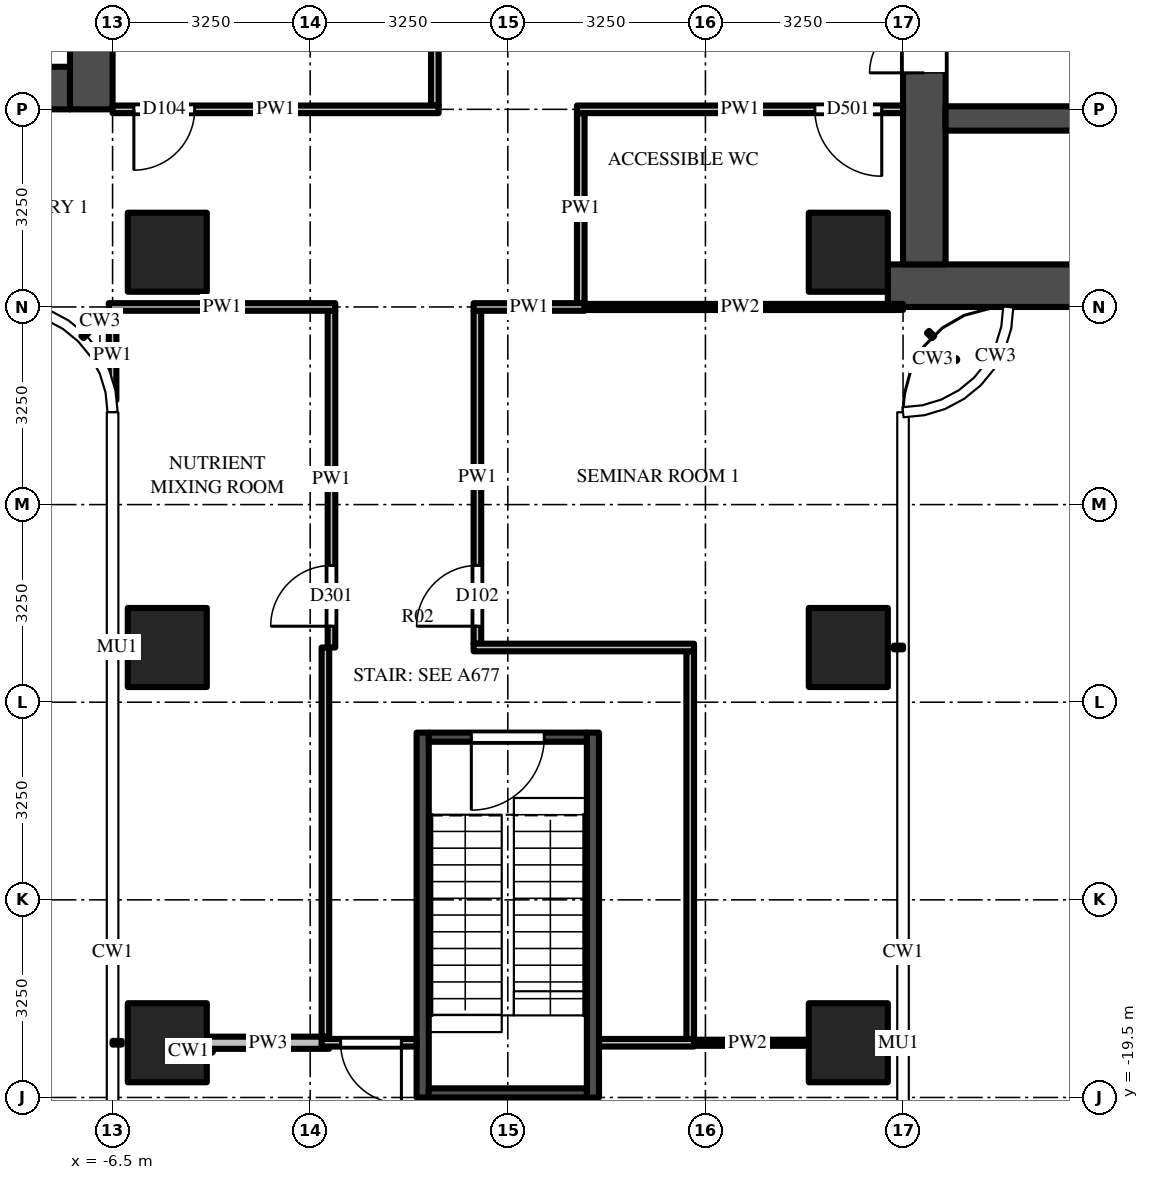
"""IFC4 building model, lengths in metres.
Left out: names, types, materials, properties, quantities, classifications, styles, units other than length and angle.
Written with IfcOpenShell. Run it as: python <this file> out.ifc"""

import sys

from ifc_helpers import new_model, si_unit, direction, frame, frame_2d, origin, origin_2d, place, context, subcontext, project, spatial, rectangle, extrude, source, transform, mapped, element, fill, save


model = new_model("IFC4")
c1 = context("Model", 3, precision=1e-05, world=origin(), true_north=direction((0.0, 1.0)))
c2 = subcontext(c1, "Body", "Model", "MODEL_VIEW")
j1 = project(units=[si_unit("LENGTHUNIT", "METRE"), si_unit("PLANEANGLEUNIT", "RADIAN")], contexts=[c1])
p1 = place(None, origin())
s1 = spatial("IfcSite", under=j1, at=p1, CompositionType="ELEMENT")
p2 = place(p1, origin())
s2 = spatial("IfcBuilding", under=s1, at=p2, CompositionType="ELEMENT")
p3 = place(p2, frame((0.0, 0.0, 102.0)))
s3 = spatial("IfcBuildingStorey", under=s2, at=p3, CompositionType="ELEMENT", Elevation=102.0)
m1 = source(origin(), c2, "Body", "SweptSolid", [
    extrude(rectangle(XDim=1.3, YDim=1.3, at=origin_2d()), origin(), (0.0, 0.0, 1.0), 4.5),
])
for number, where, z_axis, x_axis in (
    (1, (5.6, -5.6, 0.0), (0.0, 0.0, 1.0), (1.0, 0.0, 0.0)),
    (2, (-5.6, -5.6, 0.0), (0.0, 0.0, 1.0), (1.0, 0.0, 0.0)),
    (3, (5.6, -12.1, 0.0), (0.0, 0.0, 1.0), (1.0, 0.0, 0.0)),
    (4, (5.6, -18.6, 0.0), (0.0, 0.0, 1.0), (1.0, 0.0, 0.0)),
    (5, (-5.6, -12.1, 0.0), (0.0, 0.0, 1.0), (1.0, 0.0, 0.0)),
    (6, (-5.6, -18.6, 0.0), (0.0, 0.0, 1.0), (1.0, 0.0, 0.0)),
):
    element("IfcColumn", number, at=place(p3, frame(where, z_axis=z_axis, x_axis=x_axis)), inside=s3, PredefinedType="COLUMN", context=c2, shape_type="MappedRepresentation", body=[
        mapped(m1, transform((0.0, 0.0, 0.0))),
    ])
m2 = source(origin(), c2, "Body", "SweptSolid", [
    extrude(rectangle(XDim=16.5, YDim=0.7, at=frame_2d((8.25, 0.0))), origin(), (0.0, 0.0, 1.0), 4.25),
])
p4 = place(p3, frame((6.25, -6.15, 0.0), z_axis=(0.0, 0.0, 1.0), x_axis=(1.0, 0.0, 0.0)))
e7 = element("IfcWall", 7, at=p4, inside=s3, PredefinedType="SHEAR", context=c2, shape_type="MappedRepresentation", body=[
    mapped(m2, transform((0.0, 0.0, 0.0))),
])
m3 = source(origin(), c2, "Body", "SweptSolid", [
    extrude(rectangle(XDim=9.05, YDim=0.7, at=frame_2d((4.525, 0.0))), origin(), (0.0, 0.0, 1.0), 4.25),
])
p5 = place(p3, frame((6.85, -5.8, 0.0), z_axis=(0.0, 0.0, 1.0), x_axis=(0.0, 1.0, 0.0)))
e8 = element("IfcWall", 8, at=p5, inside=s3, PredefinedType="SHEAR", context=c2, shape_type="MappedRepresentation", body=[
    mapped(m3, transform((0.0, 0.0, 0.0))),
])
m4 = source(origin(), c2, "Body", "SweptSolid", [
    extrude(rectangle(XDim=1.8, YDim=2.1, at=frame_2d((0.9, 1.05))), frame((0.0, 0.36, 0.0), z_axis=(0.0, -1.0, 0.0), x_axis=(1.0, 0.0, 0.0)), (0.0, 0.0, 1.0), 0.72),
])
p6 = place(p5, frame((3.15, 0.0, 0.0)))
e9 = element("IfcOpeningElement", 9, at=p6, cuts=e8, PredefinedType="OPENING", context=c2, shape_type="MappedRepresentation", body=[
    mapped(m4, transform((0.0, 0.0, 0.0))),
])
m5 = source(origin(), c2, "Body", "SweptSolid", [
    extrude(rectangle(XDim=7.5, YDim=0.4, at=frame_2d((3.75, 0.0))), origin(), (0.0, 0.0, 1.0), 4.25),
])
p7 = place(p3, frame((7.2, -3.4, 0.0), z_axis=(0.0, 0.0, 1.0), x_axis=(1.0, 0.0, 0.0)))
e10 = element("IfcWall", 10, at=p7, inside=s3, PredefinedType="SHEAR", context=c2, shape_type="MappedRepresentation", body=[
    mapped(m5, transform((0.0, 0.0, 0.0))),
])
m6 = source(origin(), c2, "Body", "SweptSolid", [
    extrude(rectangle(XDim=1.1, YDim=2.1, at=frame_2d((0.55, 1.05))), frame((0.0, 0.21, 0.0), z_axis=(0.0, -1.0, 0.0), x_axis=(1.0, 0.0, 0.0)), (0.0, 0.0, 1.0), 0.42),
])
p8 = place(p7, frame((3.0, 0.0, 0.0)))
e11 = element("IfcOpeningElement", 11, at=p8, cuts=e10, PredefinedType="OPENING", context=c2, shape_type="MappedRepresentation", body=[
    mapped(m6, transform((0.0, 0.0, 0.0))),
])
p9 = place(p7, frame((5.5, 0.0, 0.0)))
e12 = element("IfcOpeningElement", 12, at=p9, cuts=e10, PredefinedType="OPENING", context=c2, shape_type="MappedRepresentation", body=[
    mapped(m6, transform((0.0, 0.0, 0.0))),
])
m7 = source(origin(), c2, "Body", "SweptSolid", [
    extrude(rectangle(XDim=14.85, YDim=0.7, at=frame_2d((7.425, 0.0))), origin(), (0.0, 0.0, 1.0), 4.25),
])
p10 = place(p3, frame((-7.2, -2.9, 0.0), z_axis=(0.0, 0.0, 1.0), x_axis=(-1.0, 0.0, 0.0)))
e13 = element("IfcWall", 13, at=p10, inside=s3, PredefinedType="SHEAR", context=c2, shape_type="MappedRepresentation", body=[
    mapped(m7, transform((0.0, 0.0, 0.0))),
])
m8 = source(origin(), c2, "Body", "SweptSolid", [
    extrude(rectangle(XDim=1.3, YDim=2.1, at=frame_2d((0.65, 1.05))), frame((0.0, 0.36, 0.0), z_axis=(0.0, -1.0, 0.0), x_axis=(1.0, 0.0, 0.0)), (0.0, 0.0, 1.0), 0.72),
])
p11 = place(p10, frame((12.2, 0.0, 0.0)))
e14 = element("IfcOpeningElement", 14, at=p11, cuts=e13, PredefinedType="OPENING", context=c2, shape_type="MappedRepresentation", body=[
    mapped(m8, transform((0.0, 0.0, 0.0))),
])
m9 = source(origin(), c2, "Body", "SweptSolid", [
    extrude(rectangle(XDim=1.2, YDim=2.1, at=frame_2d((0.6, 1.05))), frame((0.0, 0.36, 0.0), z_axis=(0.0, -1.0, 0.0), x_axis=(1.0, 0.0, 0.0)), (0.0, 0.0, 1.0), 0.72),
])
p12 = place(p10, frame((9.85, 0.0, 0.0)))
e15 = element("IfcOpeningElement", 15, at=p12, cuts=e13, PredefinedType="OPENING", context=c2, shape_type="MappedRepresentation", body=[
    mapped(m9, transform((0.0, 0.0, 0.0))),
])
m10 = source(origin(), c2, "Body", "SweptSolid", [
    extrude(rectangle(XDim=1.0, YDim=2.1, at=frame_2d((0.5, 1.05))), frame((0.0, 0.36, 0.0), z_axis=(0.0, -1.0, 0.0), x_axis=(1.0, 0.0, 0.0)), (0.0, 0.0, 1.0), 0.72),
])
p13 = place(p10, frame((7.9, 0.0, 0.0)))
e16 = element("IfcOpeningElement", 16, at=p13, cuts=e13, PredefinedType="OPENING", context=c2, shape_type="MappedRepresentation", body=[
    mapped(m10, transform((0.0, 0.0, 0.0))),
])
m11 = source(origin(), c2, "Body", "SweptSolid", [
    extrude(rectangle(XDim=0.9, YDim=2.1, at=frame_2d((0.45, 1.05))), frame((0.0, 0.36, 0.0), z_axis=(0.0, -1.0, 0.0), x_axis=(1.0, 0.0, 0.0)), (0.0, 0.0, 1.0), 0.72),
])
p14 = place(p10, frame((0.65, 0.0, 0.0)))
e17 = element("IfcOpeningElement", 17, at=p14, cuts=e13, PredefinedType="OPENING", context=c2, shape_type="MappedRepresentation", body=[
    mapped(m11, transform((0.0, 0.0, 0.0))),
])
p15 = place(p10, frame((3.25, 0.0, 0.0)))
e18 = element("IfcOpeningElement", 18, at=p15, cuts=e13, PredefinedType="OPENING", context=c2, shape_type="MappedRepresentation", body=[
    mapped(m11, transform((0.0, 0.0, 0.0))),
])
p16 = place(p10, frame((5.8, 0.0, 0.0)))
e19 = element("IfcOpeningElement", 19, at=p16, cuts=e13, PredefinedType="OPENING", context=c2, shape_type="MappedRepresentation", body=[
    mapped(m10, transform((0.0, 0.0, 0.0))),
])
p17 = place(p3, frame((-6.85, 5.8, 0.0), z_axis=(0.0, 0.0, 1.0), x_axis=(0.0, -1.0, 0.0)))
e20 = element("IfcWall", 20, at=p17, inside=s3, PredefinedType="SHEAR", context=c2, shape_type="MappedRepresentation", body=[
    mapped(m3, transform((0.0, 0.0, 0.0))),
])
p18 = place(p17, frame((3.15, 0.0, 0.0)))
e21 = element("IfcOpeningElement", 21, at=p18, cuts=e20, PredefinedType="OPENING", context=c2, shape_type="MappedRepresentation", body=[
    mapped(m4, transform((0.0, 0.0, 0.0))),
])
m12 = source(origin(), c2, "Body", "SweptSolid", [
    extrude(rectangle(XDim=6.0, YDim=0.2, at=frame_2d((3.0, 0.0))), origin(), (0.0, 0.0, 1.0), 4.25),
])
for number, where, z_axis, x_axis in (
    (22, (1.4, -13.5, 0.0), (0.0, 0.0, 1.0), (0.0, -1.0, 0.0)),
    (23, (-1.4, -13.5, 0.0), (0.0, 0.0, 1.0), (0.0, -1.0, 0.0)),
):
    element("IfcWall", number, at=place(p3, frame(where, z_axis=z_axis, x_axis=x_axis)), inside=s3, PredefinedType="SHEAR", context=c2, shape_type="MappedRepresentation", body=[
        mapped(m12, transform((0.0, 0.0, 0.0))),
    ])
m13 = source(origin(), c2, "Body", "SweptSolid", [
    extrude(rectangle(XDim=2.6, YDim=0.15, at=frame_2d((1.3, 0.0))), origin(), (0.0, 0.0, 1.0), 4.25),
])
p19 = place(p3, frame((1.3, -13.575, 0.0), z_axis=(0.0, 0.0, 1.0), x_axis=(-1.0, 0.0, 0.0)))
e24 = element("IfcWall", 24, at=p19, inside=s3, PredefinedType="SHEAR", context=c2, shape_type="MappedRepresentation", body=[
    mapped(m13, transform((0.0, 0.0, 0.0))),
])
m14 = source(origin(), c2, "Body", "SweptSolid", [
    extrude(rectangle(XDim=1.2, YDim=2.1, at=frame_2d((0.6, 1.05))), frame((0.0, 0.085, 0.0), z_axis=(0.0, -1.0, 0.0), x_axis=(1.0, 0.0, 0.0)), (0.0, 0.0, 1.0), 0.17),
])
p20 = place(p19, frame((0.7, 0.0, 0.0)))
e25 = element("IfcOpeningElement", 25, at=p20, cuts=e24, PredefinedType="OPENING", context=c2, shape_type="MappedRepresentation", body=[
    mapped(m14, transform((0.0, 0.0, 0.0))),
])
p21 = place(p3, frame((1.3, -19.425, 0.0), z_axis=(0.0, 0.0, 1.0), x_axis=(-1.0, 0.0, 0.0)))
e26 = element("IfcWall", 26, at=p21, inside=s3, PredefinedType="SHEAR", context=c2, shape_type="MappedRepresentation", body=[
    mapped(m13, transform((0.0, 0.0, 0.0))),
])
m15 = source(origin(), c2, "Body", "SweptSolid", [
    extrude(rectangle(XDim=1.469, YDim=0.125, at=frame_2d((0.734, 0.0))), origin(), (0.0, 0.0, 1.0), 4.25),
])
p22 = place(p3, frame((-6.5, -6.562, 0.0), z_axis=(0.0, 0.0, 1.0), x_axis=(0.0, -1.0, 0.0)))
e27 = element("IfcWall", 27, at=p22, inside=s3, PredefinedType="PARTITIONING", context=c2, shape_type="MappedRepresentation", body=[
    mapped(m15, transform((0.0, 0.0, 0.0))),
])
m16 = source(origin(), c2, "Body", "SweptSolid", [
    extrude(rectangle(XDim=6.4, YDim=0.125, at=frame_2d((3.2, 0.0))), origin(), (0.0, 0.0, 1.0), 3.468),
])
p23 = place(p3, frame((-3.0, -18.5, 0.0), z_axis=(0.0, 0.0, 1.0), x_axis=(0.0, 1.0, 0.0)))
e28 = element("IfcWall", 28, at=p23, inside=s3, PredefinedType="PARTITIONING", context=c2, shape_type="MappedRepresentation", body=[
    mapped(m16, transform((0.0, 0.0, 0.0))),
])
m17 = source(origin(), c2, "Body", "SweptSolid", [
    extrude(rectangle(XDim=5.538, YDim=0.125, at=frame_2d((2.769, 0.0))), origin(), (0.0, 0.0, 1.0), 3.468),
])
p24 = place(p3, frame((-2.9, -12.1, 0.0), z_axis=(0.0, 0.0, 1.0), x_axis=(0.0, 1.0, 0.0)))
e29 = element("IfcWall", 29, at=p24, inside=s3, PredefinedType="PARTITIONING", context=c2, shape_type="MappedRepresentation", body=[
    mapped(m17, transform((0.0, 0.0, 0.0))),
])
m18 = source(origin(), c2, "Body", "SweptSolid", [
    extrude(rectangle(XDim=1.0, YDim=2.1, at=frame_2d((0.5, 1.05))), frame((0.0, 0.073, 0.0), z_axis=(0.0, -1.0, 0.0), x_axis=(1.0, 0.0, 0.0)), (0.0, 0.0, 1.0), 0.145),
])
p25 = place(p24, frame((0.35, 0.0, 0.0)))
e30 = element("IfcOpeningElement", 30, at=p25, cuts=e29, PredefinedType="OPENING", context=c2, shape_type="MappedRepresentation", body=[
    mapped(m18, transform((0.0, 0.0, 0.0))),
])
m19 = source(origin(), c2, "Body", "SweptSolid", [
    extrude(rectangle(XDim=3.125, YDim=0.125, at=frame_2d((1.562, 0.0))), origin(), (0.0, 0.0, 1.0), 3.546),
])
p26 = place(p3, frame((-1.2, -0.062, 0.0), z_axis=(0.0, 0.0, 1.0), x_axis=(0.0, -1.0, 0.0)))
e31 = element("IfcWall", 31, at=p26, inside=s3, PredefinedType="PARTITIONING", context=c2, shape_type="MappedRepresentation", body=[
    mapped(m19, transform((0.0, 0.0, 0.0))),
])
m20 = source(origin(), c2, "Body", "SweptSolid", [
    extrude(rectangle(XDim=5.475, YDim=0.125, at=frame_2d((2.738, 0.0))), origin(), (0.0, 0.0, 1.0), 3.468),
])
p27 = place(p3, frame((-0.5, -12.038, 0.0), z_axis=(0.0, 0.0, 1.0), x_axis=(0.0, 1.0, 0.0)))
e32 = element("IfcWall", 32, at=p27, inside=s3, PredefinedType="PARTITIONING", context=c2, shape_type="MappedRepresentation", body=[
    mapped(m20, transform((0.0, 0.0, 0.0))),
])
p28 = place(p27, frame((0.288, 0.0, 0.0)))
e33 = element("IfcOpeningElement", 33, at=p28, cuts=e32, PredefinedType="OPENING", context=c2, shape_type="MappedRepresentation", body=[
    mapped(m18, transform((0.0, 0.0, 0.0))),
])
m21 = source(origin(), c2, "Body", "SweptSolid", [
    extrude(rectangle(XDim=3.137, YDim=0.125, at=frame_2d((1.569, 0.0))), origin(), (0.0, 0.0, 1.0), 3.468),
])
p29 = place(p3, frame((1.2, -3.312, 0.0), z_axis=(0.0, 0.0, 1.0), x_axis=(0.0, -1.0, 0.0)))
e34 = element("IfcWall", 34, at=p29, inside=s3, PredefinedType="PARTITIONING", context=c2, shape_type="MappedRepresentation", body=[
    mapped(m21, transform((0.0, 0.0, 0.0))),
])
m22 = source(origin(), c2, "Body", "SweptSolid", [
    extrude(rectangle(XDim=6.387, YDim=0.125, at=frame_2d((3.194, 0.0))), origin(), (0.0, 0.0, 1.0), 3.468),
])
p30 = place(p3, frame((3.0, -12.163, 0.0), z_axis=(0.0, 0.0, 1.0), x_axis=(0.0, -1.0, 0.0)))
e35 = element("IfcWall", 35, at=p30, inside=s3, PredefinedType="PARTITIONING", context=c2, shape_type="MappedRepresentation", body=[
    mapped(m22, transform((0.0, 0.0, 0.0))),
])
m23 = source(origin(), c2, "Body", "SweptSolid", [
    extrude(rectangle(XDim=2.012, YDim=0.2, at=frame_2d((1.006, 0.0))), origin(), (0.0, 0.0, 1.0), 3.697),
])
p31 = place(p3, frame((-4.95, -18.6, 0.0), z_axis=(0.0, 0.0, 1.0), x_axis=(1.0, 0.0, 0.0)))
e36 = element("IfcWall", 36, at=p31, inside=s3, PredefinedType="PARTITIONING", context=c2, shape_type="MappedRepresentation", body=[
    mapped(m23, transform((0.0, 0.0, 0.0))),
])
m24 = source(origin(), c2, "Body", "SweptSolid", [
    extrude(rectangle(XDim=2.012, YDim=0.1, at=frame_2d((1.006, 0.0))), origin(), (0.0, 0.0, 1.0), 3.697),
])
p32 = place(p3, frame((2.938, -18.6, 0.0), z_axis=(0.0, 0.0, 1.0), x_axis=(1.0, 0.0, 0.0)))
e37 = element("IfcWall", 37, at=p32, inside=s3, PredefinedType="PARTITIONING", context=c2, shape_type="MappedRepresentation", body=[
    mapped(m24, transform((0.0, 0.0, 0.0))),
])
m25 = source(origin(), c2, "Body", "SweptSolid", [
    extrude(rectangle(XDim=1.562, YDim=0.125, at=frame_2d((0.781, 0.0))), origin(), (0.0, 0.0, 1.0), 3.697),
])
p33 = place(p3, frame((-1.5, -18.6, 0.0), z_axis=(0.0, 0.0, 1.0), x_axis=(-1.0, 0.0, 0.0)))
e38 = element("IfcWall", 38, at=p33, inside=s3, PredefinedType="PARTITIONING", context=c2, shape_type="MappedRepresentation", body=[
    mapped(m25, transform((0.0, 0.0, 0.0))),
])
p34 = place(p33, frame((0.25, 0.0, 0.0)))
e39 = element("IfcOpeningElement", 39, at=p34, cuts=e38, PredefinedType="OPENING", context=c2, shape_type="MappedRepresentation", body=[
    mapped(m18, transform((0.0, 0.0, 0.0))),
])
p35 = place(p3, frame((3.062, -18.6, 0.0), z_axis=(0.0, 0.0, 1.0), x_axis=(-1.0, 0.0, 0.0)))
e40 = element("IfcWall", 40, at=p35, inside=s3, PredefinedType="PARTITIONING", context=c2, shape_type="MappedRepresentation", body=[
    mapped(m25, transform((0.0, 0.0, 0.0))),
])
m26 = source(origin(), c2, "Body", "SweptSolid", [
    extrude(rectangle(XDim=3.625, YDim=0.125, at=frame_2d((1.812, 0.0))), origin(), (0.0, 0.0, 1.0), 3.468),
])
p36 = place(p3, frame((-0.562, -12.1, 0.0), z_axis=(0.0, 0.0, 1.0), x_axis=(1.0, 0.0, 0.0)))
e41 = element("IfcWall", 41, at=p36, inside=s3, PredefinedType="PARTITIONING", context=c2, shape_type="MappedRepresentation", body=[
    mapped(m26, transform((0.0, 0.0, 0.0))),
])
m27 = source(origin(), c2, "Body", "SweptSolid", [
    extrude(rectangle(XDim=5.363, YDim=0.1, at=frame_2d((2.681, 0.0))), origin(), (0.0, 0.0, 1.0), 3.33),
])
p37 = place(p3, frame((1.137, -6.5, 0.0), z_axis=(0.0, 0.0, 1.0), x_axis=(1.0, 0.0, 0.0)))
e42 = element("IfcWall", 42, at=p37, inside=s3, PredefinedType="PARTITIONING", context=c2, shape_type="MappedRepresentation", body=[
    mapped(m27, transform((0.0, 0.0, 0.0))),
])
m28 = source(origin(), c2, "Body", "SweptSolid", [
    extrude(rectangle(XDim=3.725, YDim=0.125, at=frame_2d((1.863, 0.0))), origin(), (0.0, 0.0, 1.0), 3.33),
])
p38 = place(p3, frame((-2.837, -6.5, 0.0), z_axis=(0.0, 0.0, 1.0), x_axis=(-1.0, 0.0, 0.0)))
e43 = element("IfcWall", 43, at=p38, inside=s3, PredefinedType="PARTITIONING", context=c2, shape_type="MappedRepresentation", body=[
    mapped(m28, transform((0.0, 0.0, 0.0))),
])
m29 = source(origin(), c2, "Body", "SweptSolid", [
    extrude(rectangle(XDim=1.825, YDim=0.125, at=frame_2d((0.913, 0.0))), origin(), (0.0, 0.0, 1.0), 4.25),
])
p39 = place(p3, frame((1.262, -6.5, 0.0), z_axis=(0.0, 0.0, 1.0), x_axis=(-1.0, 0.0, 0.0)))
e44 = element("IfcWall", 44, at=p39, inside=s3, PredefinedType="PARTITIONING", context=c2, shape_type="MappedRepresentation", body=[
    mapped(m29, transform((0.0, 0.0, 0.0))),
])
m30 = source(origin(), c2, "Body", "SweptSolid", [
    extrude(rectangle(XDim=5.363, YDim=0.125, at=frame_2d((2.681, 0.0))), origin(), (0.0, 0.0, 1.0), 3.468),
])
p40 = place(p3, frame((-1.137, -3.25, 0.0), z_axis=(0.0, 0.0, 1.0), x_axis=(-1.0, 0.0, 0.0)))
e45 = element("IfcWall", 45, at=p40, inside=s3, PredefinedType="PARTITIONING", context=c2, shape_type="MappedRepresentation", body=[
    mapped(m30, transform((0.0, 0.0, 0.0))),
])
p41 = place(p40, frame((4.012, 0.0, 0.0)))
e46 = element("IfcOpeningElement", 46, at=p41, cuts=e45, PredefinedType="OPENING", context=c2, shape_type="MappedRepresentation", body=[
    mapped(m18, transform((0.0, 0.0, 0.0))),
])
p42 = place(p3, frame((6.5, -3.25, 0.0), z_axis=(0.0, 0.0, 1.0), x_axis=(-1.0, 0.0, 0.0)))
e47 = element("IfcWall", 47, at=p42, inside=s3, PredefinedType="PARTITIONING", context=c2, shape_type="MappedRepresentation", body=[
    mapped(m30, transform((0.0, 0.0, 0.0))),
])
m31 = source(origin(), c2, "Body", "SweptSolid", [
    extrude(rectangle(XDim=1.1, YDim=2.1, at=frame_2d((0.55, 1.05))), frame((0.0, 0.073, 0.0), z_axis=(0.0, -1.0, 0.0), x_axis=(1.0, 0.0, 0.0)), (0.0, 0.0, 1.0), 0.145),
])
p43 = place(p42, frame((0.35, 0.0, 0.0)))
e48 = element("IfcOpeningElement", 48, at=p43, cuts=e47, PredefinedType="OPENING", context=c2, shape_type="MappedRepresentation", body=[
    mapped(m31, transform((0.0, 0.0, 0.0))),
])
m32 = source(origin(), c2, "Body", "SweptSolid", [
    extrude(rectangle(XDim=1.8, YDim=2.1, at=frame_2d((0.9, 1.05))), frame((0.0, -0.275, 0.0), z_axis=(0.0, -1.0, 0.0), x_axis=(1.0, 0.0, 0.0)), (0.0, 0.0, 1.0), 0.05),
])
p44 = place(p6, origin())
e49 = element("IfcDoor", 49, at=p44, inside=s3, OperationType="DOUBLE_DOOR_SINGLE_SWING", PredefinedType="DOOR", context=c2, shape_type="MappedRepresentation", body=[
    mapped(m32, transform((0.0, 0.0, 0.0))),
])
fill(e9, e49)
m33 = source(origin(), c2, "Body", "SweptSolid", [
    extrude(rectangle(XDim=1.2, YDim=2.1, at=frame_2d((0.6, 1.05))), frame((0.0, 0.025, 0.0), z_axis=(0.0, -1.0, 0.0), x_axis=(1.0, 0.0, 0.0)), (0.0, 0.0, 1.0), 0.05),
])
p45 = place(p20, origin())
e50 = element("IfcDoor", 50, at=p45, inside=s3, OperationType="SINGLE_SWING_RIGHT", PredefinedType="DOOR", context=c2, shape_type="MappedRepresentation", body=[
    mapped(m33, transform((0.0, 0.0, 0.0))),
])
fill(e25, e50)
m34 = source(origin(), c2, "Body", "SweptSolid", [
    extrude(rectangle(XDim=1.0, YDim=2.1, at=frame_2d((0.5, 1.05))), frame((0.0, 0.025, 0.0), z_axis=(0.0, -1.0, 0.0), x_axis=(1.0, 0.0, 0.0)), (0.0, 0.0, 1.0), 0.05),
])
p46 = place(p34, origin())
e51 = element("IfcDoor", 51, at=p46, inside=s3, OperationType="SINGLE_SWING_LEFT", PredefinedType="DOOR", context=c2, shape_type="MappedRepresentation", body=[
    mapped(m34, transform((0.0, 0.0, 0.0))),
])
fill(e39, e51)
p47 = place(p25, origin())
e52 = element("IfcDoor", 52, at=p47, inside=s3, OperationType="SINGLE_SWING_LEFT", PredefinedType="DOOR", context=c2, shape_type="MappedRepresentation", body=[
    mapped(m34, transform((0.0, 0.0, 0.0))),
])
fill(e30, e52)
p48 = place(p28, origin())
e53 = element("IfcDoor", 53, at=p48, inside=s3, OperationType="SINGLE_SWING_LEFT", PredefinedType="DOOR", context=c2, shape_type="MappedRepresentation", body=[
    mapped(m34, transform((0.0, 0.0, 0.0))),
])
fill(e33, e53)
p49 = place(p41, origin())
e54 = element("IfcDoor", 54, at=p49, inside=s3, OperationType="SINGLE_SWING_RIGHT", PredefinedType="DOOR", context=c2, shape_type="MappedRepresentation", body=[
    mapped(m34, transform((0.0, 0.0, 0.0))),
])
fill(e46, e54)
m35 = source(origin(), c2, "Body", "SweptSolid", [
    extrude(rectangle(XDim=1.1, YDim=2.1, at=frame_2d((0.55, 1.05))), frame((0.0, 0.025, 0.0), z_axis=(0.0, -1.0, 0.0), x_axis=(1.0, 0.0, 0.0)), (0.0, 0.0, 1.0), 0.05),
])
p50 = place(p43, origin())
e55 = element("IfcDoor", 55, at=p50, inside=s3, OperationType="SINGLE_SWING_LEFT", PredefinedType="DOOR", context=c2, shape_type="MappedRepresentation", body=[
    mapped(m35, transform((0.0, 0.0, 0.0))),
])
fill(e48, e55)
save(model, sys.argv[1])
